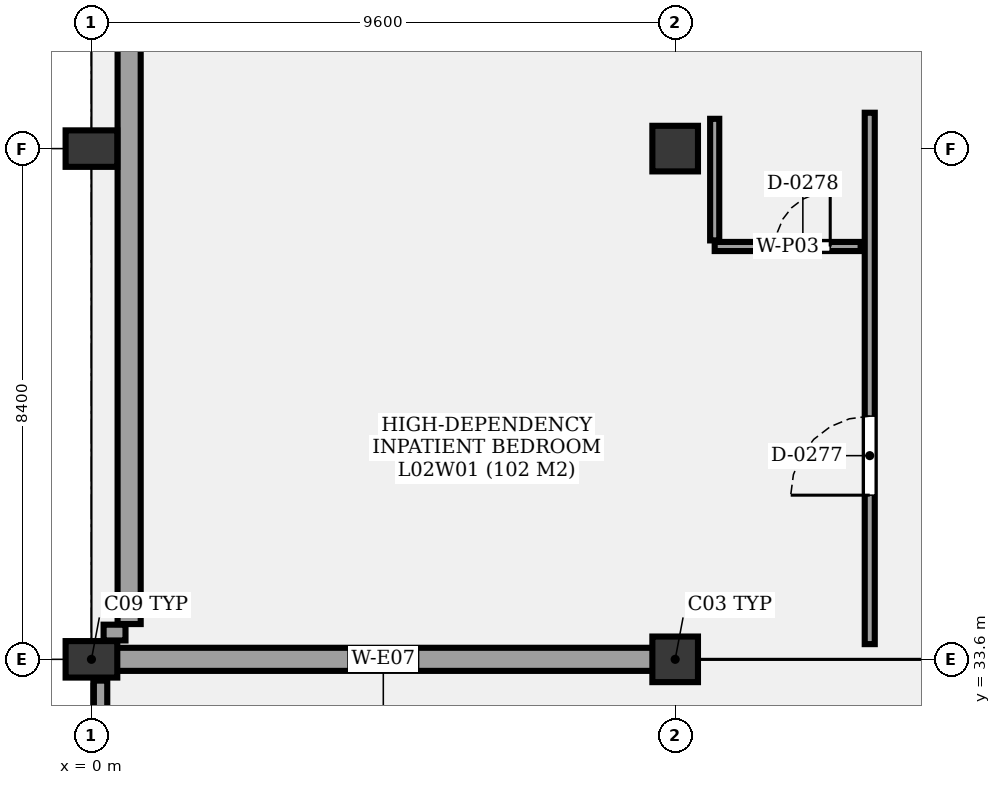
"""IFC4 building model, lengths in metres.
Left out: names, types, materials, properties, quantities, classifications, styles, units other than length and angle.
Written with IfcOpenShell. Run it as: python <this file> out.ifc"""

import sys

from ifc_helpers import new_model, si_unit, direction, frame, frame_2d, origin, origin_2d, place, context, subcontext, project, spatial, rectangle, extrude, element, fill, save


model = new_model("IFC4")
c1 = context("Model", 3, precision=1e-05, world=origin(), true_north=direction((0.0, 1.0)))
c2 = subcontext(c1, "Body", "Model", "MODEL_VIEW")
j1 = project(units=[si_unit("LENGTHUNIT", "METRE"), si_unit("PLANEANGLEUNIT", "RADIAN")], contexts=[c1])
p1 = place(None, origin())
s1 = spatial("IfcSite", under=j1, at=p1, CompositionType="ELEMENT")
p2 = place(p1, origin())
s2 = spatial("IfcBuilding", under=s1, at=p2, CompositionType="ELEMENT")
p3 = place(p2, frame((0.0, 0.0, 9.9)))
s3 = spatial("IfcBuildingStorey", under=s2, at=p3, CompositionType="ELEMENT", Elevation=9.9)
for number, where, z_axis, x_axis in (
    (1, (0.0, 33.6, 0.0), (0.0, 0.0, 1.0), (1.0, 0.0, 0.0)),
    (2, (0.0, 42.0, 0.0), (0.0, 0.0, 1.0), (1.0, 0.0, 0.0)),
):
    element("IfcColumn", number, at=place(p3, frame(where, z_axis=z_axis, x_axis=x_axis)), inside=s3, PredefinedType="COLUMN", context=c2, shape_type="SweptSolid", body=[
        extrude(rectangle(XDim=0.85, YDim=0.6, at=origin_2d()), origin(), (0.0, 0.0, 1.0), 3.6),
    ])
for number, where, z_axis, x_axis in (
    (3, (9.6, 33.6, 0.0), (0.0, 0.0, 1.0), (1.0, 0.0, 0.0)),
    (4, (9.6, 42.0, 0.0), (0.0, 0.0, 1.0), (1.0, 0.0, 0.0)),
):
    element("IfcColumn", number, at=place(p3, frame(where, z_axis=z_axis, x_axis=x_axis)), inside=s3, PredefinedType="COLUMN", context=c2, shape_type="SweptSolid", body=[
        extrude(rectangle(XDim=0.75, YDim=0.75, at=origin_2d()), origin(), (0.0, 0.0, 1.0), 3.6),
    ])
p4 = place(p3, frame((9.6, 33.6, 0.0), z_axis=(0.0, 0.0, 1.0), x_axis=(-1.0, 0.0, 0.0)))
e5 = element("IfcWall", 5, at=p4, inside=s3, PredefinedType="SOLIDWALL", context=c2, shape_type="SweptSolid", body=[
    extrude(rectangle(XDim=9.6, YDim=0.38, at=frame_2d((4.8, 0.0))), origin(), (0.0, 0.0, 1.0), 2.57),
])
p5 = place(p4, frame((4.225, 0.0, 0.85)))
e6 = element("IfcOpeningElement", 6, at=p5, cuts=e5, PredefinedType="OPENING", context=c2, shape_type="SweptSolid", body=[
    extrude(rectangle(XDim=1.15, YDim=1.2, at=frame_2d((0.575, 0.6))), frame((0.0, 0.2, 0.0), z_axis=(0.0, -1.0, 0.0), x_axis=(1.0, 0.0, 0.0)), (0.0, 0.0, 1.0), 0.4),
])
p6 = place(p3, frame((0.2, 34.04, 0.0), z_axis=(0.0, 0.0, 1.0), x_axis=(1.0, 0.0, 0.0)))
e7 = element("IfcWall", 7, at=p6, inside=s3, PredefinedType="SOLIDWALL", context=c2, shape_type="SweptSolid", body=[
    extrude(rectangle(XDim=0.36, YDim=0.26, at=frame_2d((0.18, 0.0))), origin(), (0.0, 0.0, 1.0), 2.57),
])
p7 = place(p3, frame((0.62, 34.18, 0.0), z_axis=(0.0, 0.0, 1.0), x_axis=(0.0, 1.0, 0.0)))
e8 = element("IfcWall", 8, at=p7, inside=s3, PredefinedType="SOLIDWALL", context=c2, shape_type="SweptSolid", body=[
    extrude(rectangle(XDim=32.6, YDim=0.38, at=frame_2d((16.3, 0.0))), origin(), (0.0, 0.0, 1.0), 2.57),
])
p8 = place(p3, frame((0.15, 17.0, 0.0), z_axis=(0.0, 0.0, 1.0), x_axis=(0.0, 1.0, 0.0)))
e9 = element("IfcWall", 9, at=p8, inside=s3, PredefinedType="PARAPET", context=c2, shape_type="SweptSolid", body=[
    extrude(rectangle(XDim=16.25, YDim=0.22, at=frame_2d((8.125, 0.0))), origin(), (0.0, 0.0, 1.0), 1.15),
])
p9 = place(p3, frame((12.8, 33.85, 0.0), z_axis=(0.0, 0.0, 1.0), x_axis=(0.0, 1.0, 0.0)))
e10 = element("IfcWall", 10, at=p9, inside=s3, PredefinedType="PARTITIONING", context=c2, shape_type="SweptSolid", body=[
    extrude(rectangle(XDim=8.74, YDim=0.165, at=frame_2d((4.37, 0.0))), origin(), (0.0, 0.0, 1.0), 2.48),
])
p10 = place(p9, frame((2.45, 0.0, 0.0)))
e11 = element("IfcOpeningElement", 11, at=p10, cuts=e10, PredefinedType="OPENING", context=c2, shape_type="SweptSolid", body=[
    extrude(rectangle(XDim=1.3, YDim=2.2, at=frame_2d((0.65, 1.1))), frame((0.0, 0.093, 0.0), z_axis=(0.0, -1.0, 0.0), x_axis=(1.0, 0.0, 0.0)), (0.0, 0.0, 1.0), 0.185),
])
p11 = place(p3, frame((10.25, 40.39, 0.0), z_axis=(0.0, 0.0, 1.0), x_axis=(1.0, 0.0, 0.0)))
e12 = element("IfcWall", 12, at=p11, inside=s3, PredefinedType="PARTITIONING", context=c2, shape_type="SweptSolid", body=[
    extrude(rectangle(XDim=2.4, YDim=0.15, at=frame_2d((1.2, 0.0))), origin(), (0.0, 0.0, 1.0), 2.48),
])
p12 = place(p11, frame((1.0, 0.0, 0.0)))
e13 = element("IfcOpeningElement", 13, at=p12, cuts=e12, PredefinedType="OPENING", context=c2, shape_type="SweptSolid", body=[
    extrude(rectangle(XDim=0.9, YDim=2.1, at=frame_2d((0.45, 1.05))), frame((0.0, 0.085, 0.0), z_axis=(0.0, -1.0, 0.0), x_axis=(1.0, 0.0, 0.0)), (0.0, 0.0, 1.0), 0.17),
])
p13 = place(p3, frame((10.25, 40.49, 0.0), z_axis=(0.0, 0.0, 1.0), x_axis=(0.0, 1.0, 0.0)))
e14 = element("IfcWall", 14, at=p13, inside=s3, PredefinedType="PARTITIONING", context=c2, shape_type="SweptSolid", body=[
    extrude(rectangle(XDim=2.0, YDim=0.15, at=frame_2d((1.0, 0.0))), origin(), (0.0, 0.0, 1.0), 2.48),
])
p14 = place(p5, origin())
e15 = element("IfcWindow", 15, at=p14, inside=s3, PartitioningType="SINGLE_PANEL", PredefinedType="WINDOW", context=c2, shape_type="SweptSolid", body=[
    extrude(rectangle(XDim=1.15, YDim=1.2, at=frame_2d((0.575, 0.6))), frame((0.0, 0.03, 0.0), z_axis=(0.0, -1.0, 0.0), x_axis=(1.0, 0.0, 0.0)), (0.0, 0.0, 1.0), 0.06),
])
fill(e6, e15)
p15 = place(p10, origin())
e16 = element("IfcDoor", 16, at=p15, inside=s3, OperationType="SINGLE_SWING_LEFT", PredefinedType="DOOR", context=c2, shape_type="SweptSolid", body=[
    extrude(rectangle(XDim=1.3, YDim=2.2, at=frame_2d((0.65, 1.1))), frame((0.0, 0.025, 0.0), z_axis=(0.0, -1.0, 0.0), x_axis=(1.0, 0.0, 0.0)), (0.0, 0.0, 1.0), 0.05),
])
fill(e11, e16)
p16 = place(p12, origin())
e17 = element("IfcDoor", 17, at=p16, inside=s3, OperationType="SINGLE_SWING_RIGHT", PredefinedType="DOOR", context=c2, shape_type="SweptSolid", body=[
    extrude(rectangle(XDim=0.9, YDim=2.1, at=frame_2d((0.45, 1.05))), frame((0.0, 0.025, 0.0), z_axis=(0.0, -1.0, 0.0), x_axis=(1.0, 0.0, 0.0)), (0.0, 0.0, 1.0), 0.05),
])
fill(e13, e17)
save(model, sys.argv[1])
